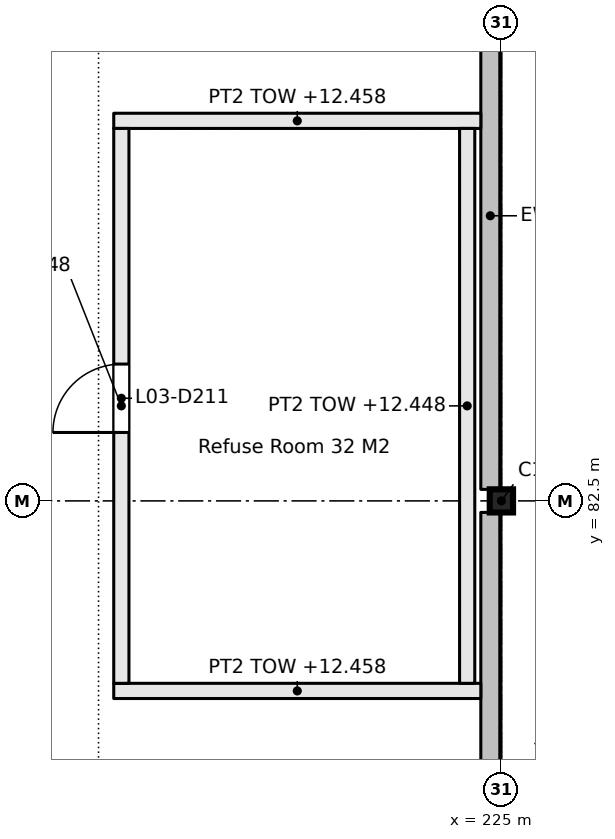
"""IFC4 building model, lengths in metres.
Left out: names, types, materials, properties, quantities, classifications, styles, units other than length and angle.
Written with IfcOpenShell. Run it as: python <this file> out.ifc"""

import sys

from ifc_helpers import new_model, si_unit, direction, frame, frame_2d, origin, origin_2d, place, context, subcontext, project, spatial, rectangle, i_section, extrude, element, fill, save


model = new_model("IFC4")
c1 = context("Model", 3, precision=1e-05, world=origin(), true_north=direction((0.0, 1.0)))
c2 = subcontext(c1, "Body", "Model", "MODEL_VIEW")
j1 = project(units=[si_unit("LENGTHUNIT", "METRE"), si_unit("PLANEANGLEUNIT", "RADIAN")], contexts=[c1])
p1 = place(None, origin())
s1 = spatial("IfcSite", under=j1, at=p1, CompositionType="ELEMENT")
p2 = place(p1, origin())
s2 = spatial("IfcBuilding", under=s1, at=p2, CompositionType="ELEMENT")
p3 = place(p2, frame((0.0, 0.0, 9.9)))
s3 = spatial("IfcBuildingStorey", under=s2, at=p3, CompositionType="ELEMENT", Elevation=9.9)
p4 = place(p3, frame((225.0, 82.5, 0.0), z_axis=(0.0, 0.0, 1.0), x_axis=(0.0, 1.0, 0.0)))
e1 = element("IfcColumn", 1, at=p4, inside=s3, PredefinedType="COLUMN", context=c2, shape_type="SweptSolid", body=[
    extrude(i_section(OverallWidth=0.305, OverallDepth=0.307, WebThickness=0.01, FlangeThickness=0.015, FilletRadius=0.015, at=origin_2d()), origin(), (0.0, 0.0, 1.0), 3.3),
])
for number, where, z_axis, x_axis in (
    (2, (219.9, 80.0, 0.0), (0.0, 0.0, 1.0), (1.0, 0.0, 0.0)),
    (3, (219.9, 87.5, 0.0), (0.0, 0.0, 1.0), (1.0, 0.0, 0.0)),
):
    element("IfcWall", number, at=place(p3, frame(where, z_axis=z_axis, x_axis=x_axis)), inside=s3, PredefinedType="PARTITIONING", context=c2, shape_type="SweptSolid", body=[
        extrude(rectangle(XDim=4.829, YDim=0.2, at=frame_2d((2.415, 0.0))), origin(), (0.0, 0.0, 1.0), 2.558),
    ])
p5 = place(p3, frame((220.0, 80.1, 0.0), z_axis=(0.0, 0.0, 1.0), x_axis=(0.0, 1.0, 0.0)))
e4 = element("IfcWall", 4, at=p5, inside=s3, PredefinedType="PARTITIONING", context=c2, shape_type="SweptSolid", body=[
    extrude(rectangle(XDim=7.3, YDim=0.2, at=frame_2d((3.65, 0.0))), origin(), (0.0, 0.0, 1.0), 2.548),
])
p6 = place(p5, frame((3.3, 0.0, 0.0)))
e5 = element("IfcOpeningElement", 5, at=p6, cuts=e4, PredefinedType="OPENING", context=c2, shape_type="SweptSolid", body=[
    extrude(rectangle(XDim=0.9, YDim=2.1, at=frame_2d((0.45, 1.05))), frame((0.0, 0.11, 0.0), z_axis=(0.0, -1.0, 0.0), x_axis=(1.0, 0.0, 0.0)), (0.0, 0.0, 1.0), 0.22),
])
p7 = place(p3, frame((224.55, 80.1, 0.0), z_axis=(0.0, 0.0, 1.0), x_axis=(0.0, 1.0, 0.0)))
e6 = element("IfcWall", 6, at=p7, inside=s3, PredefinedType="PARTITIONING", context=c2, shape_type="SweptSolid", body=[
    extrude(rectangle(XDim=7.3, YDim=0.2, at=frame_2d((3.65, 0.0))), origin(), (0.0, 0.0, 1.0), 2.548),
])
p8 = place(p3, frame((224.854, 75.152, 0.0), z_axis=(0.0, 0.0, 1.0), x_axis=(0.0, 1.0, 0.0)))
e7 = element("IfcWall", 7, at=p8, inside=s3, PredefinedType="SOLIDWALL", context=c2, shape_type="SweptSolid", body=[
    extrude(rectangle(XDim=7.197, YDim=0.25, at=frame_2d((3.598, 0.0))), origin(), (0.0, 0.0, 1.0), 1.1),
])
p9 = place(p3, frame((224.854, 82.652, 0.0), z_axis=(0.0, 0.0, 1.0), x_axis=(0.0, 1.0, 0.0)))
e8 = element("IfcWall", 8, at=p9, inside=s3, PredefinedType="SOLIDWALL", context=c2, shape_type="SweptSolid", body=[
    extrude(rectangle(XDim=7.199, YDim=0.25, at=frame_2d((3.6, 0.0))), origin(), (0.0, 0.0, 1.0), 1.1),
])
p10 = place(p6, origin())
e9 = element("IfcDoor", 9, at=p10, inside=s3, OperationType="SINGLE_SWING_RIGHT", PredefinedType="DOOR", context=c2, shape_type="SweptSolid", body=[
    extrude(rectangle(XDim=0.9, YDim=2.1, at=frame_2d((0.45, 1.05))), frame((0.0, 0.025, 0.0), z_axis=(0.0, -1.0, 0.0), x_axis=(1.0, 0.0, 0.0)), (0.0, 0.0, 1.0), 0.05),
])
fill(e5, e9)
save(model, sys.argv[1])
